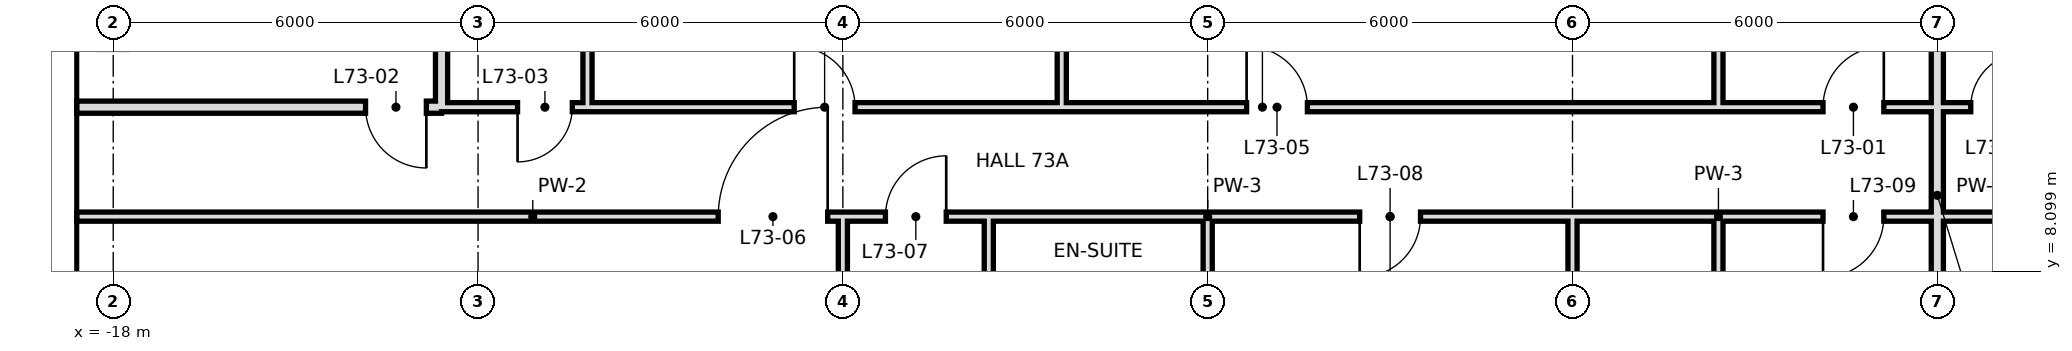
"""IFC4 building model, lengths in metres.
Left out: names, types, materials, properties, quantities, classifications, styles, units other than length and angle.
Written with IfcOpenShell. Run it as: python <this file> out.ifc"""

import sys

from ifc_helpers import new_model, si_unit, direction, frame, frame_2d, origin, place, context, subcontext, project, spatial, rectangle, extrude, element, fill, save


model = new_model("IFC4")
c1 = context("Model", 3, precision=1e-05, world=origin(), true_north=direction((0.0, 1.0)))
c2 = subcontext(c1, "Body", "Model", "MODEL_VIEW")
j1 = project(units=[si_unit("LENGTHUNIT", "METRE"), si_unit("PLANEANGLEUNIT", "RADIAN")], contexts=[c1])
p1 = place(None, origin())
s1 = spatial("IfcSite", under=j1, at=p1, CompositionType="ELEMENT")
p2 = place(p1, origin())
s2 = spatial("IfcBuilding", under=s1, at=p2, CompositionType="ELEMENT")
p3 = place(p2, frame((0.0, 0.0, 308.8)))
s3 = spatial("IfcBuildingStorey", under=s2, at=p3, CompositionType="ELEMENT", Elevation=308.8)
p4 = place(p3, frame((-10.2, 10.8, 0.0), z_axis=(0.0, 0.0, 1.0), x_axis=(0.0, 1.0, 0.0)))
e1 = element("IfcWall", 1, at=p4, inside=s3, PredefinedType="PARTITIONING", context=c2, shape_type="SweptSolid", body=[
    extrude(rectangle(XDim=7.2, YDim=0.15, at=frame_2d((3.6, 0.0))), origin(), (0.0, 0.0, 1.0), 3.42),
])
p5 = place(p3, frame((-12.6, 10.8, 0.0), z_axis=(0.0, 0.0, 1.0), x_axis=(0.0, 1.0, 0.0)))
e2 = element("IfcWall", 2, at=p5, inside=s3, PredefinedType="SOLIDWALL", context=c2, shape_type="SweptSolid", body=[
    extrude(rectangle(XDim=7.2, YDim=0.2, at=frame_2d((3.6, 0.0))), origin(), (0.0, 0.0, 1.0), 2.97),
])
p6 = place(p3, frame((-2.4, 10.8, 0.0), z_axis=(0.0, 0.0, 1.0), x_axis=(0.0, 1.0, 0.0)))
e3 = element("IfcWall", 3, at=p6, inside=s3, PredefinedType="PARTITIONING", context=c2, shape_type="SweptSolid", body=[
    extrude(rectangle(XDim=7.2, YDim=0.15, at=frame_2d((3.6, 0.0))), origin(), (0.0, 0.0, 1.0), 3.42),
])
p7 = place(p3, frame((-3.6, 6.0, 0.0), z_axis=(0.0, 0.0, 1.0), x_axis=(0.0, 1.0, 0.0)))
e4 = element("IfcWall", 4, at=p7, inside=s3, PredefinedType="PARTITIONING", context=c2, shape_type="SweptSolid", body=[
    extrude(rectangle(XDim=3.0, YDim=0.15, at=frame_2d((1.5, 0.0))), origin(), (0.0, 0.0, 1.0), 3.42),
])
p8 = place(p3, frame((-6.0, -0.6, 0.0), z_axis=(0.0, 0.0, 1.0), x_axis=(0.0, 1.0, 0.0)))
e5 = element("IfcWall", 5, at=p8, inside=s3, PredefinedType="PARTITIONING", context=c2, shape_type="SweptSolid", body=[
    extrude(rectangle(XDim=9.6, YDim=0.15, at=frame_2d((4.8, 0.0))), origin(), (0.0, 0.0, 1.0), 3.42),
])
p9 = place(p3, frame((0.0, 6.0, 0.0), z_axis=(0.0, 0.0, 1.0), x_axis=(0.0, 1.0, 0.0)))
e6 = element("IfcWall", 6, at=p9, inside=s3, PredefinedType="PARTITIONING", context=c2, shape_type="SweptSolid", body=[
    extrude(rectangle(XDim=3.0, YDim=0.15, at=frame_2d((1.5, 0.0))), origin(), (0.0, 0.0, 1.0), 2.72),
])
p10 = place(p3, frame((12.0, 0.0, 0.0), z_axis=(0.0, 0.0, 1.0), x_axis=(0.0, 1.0, 0.0)))
e7 = element("IfcWall", 7, at=p10, inside=s3, PredefinedType="SOLIDWALL", context=c2, shape_type="SweptSolid", body=[
    extrude(rectangle(XDim=18.7, YDim=0.2, at=frame_2d((9.35, 0.0))), origin(), (0.0, 0.0, 1.0), 2.72),
])
p11 = place(p3, frame((6.0, 6.0, 0.0), z_axis=(0.0, 0.0, 1.0), x_axis=(0.0, 1.0, 0.0)))
e8 = element("IfcWall", 8, at=p11, inside=s3, PredefinedType="PARTITIONING", context=c2, shape_type="SweptSolid", body=[
    extrude(rectangle(XDim=3.0, YDim=0.15, at=frame_2d((1.5, 0.0))), origin(), (0.0, 0.0, 1.0), 2.72),
])
p12 = place(p3, frame((8.4, 10.8, 0.0), z_axis=(0.0, 0.0, 1.0), x_axis=(0.0, 1.0, 0.0)))
e9 = element("IfcWall", 9, at=p12, inside=s3, PredefinedType="PARTITIONING", context=c2, shape_type="SweptSolid", body=[
    extrude(rectangle(XDim=7.9, YDim=0.15, at=frame_2d((3.95, 0.0))), origin(), (0.0, 0.0, 1.0), 3.42),
])
p13 = place(p3, frame((8.4, 6.0, 0.0), z_axis=(0.0, 0.0, 1.0), x_axis=(0.0, 1.0, 0.0)))
e10 = element("IfcWall", 10, at=p13, inside=s3, PredefinedType="PARTITIONING", context=c2, shape_type="SweptSolid", body=[
    extrude(rectangle(XDim=3.0, YDim=0.15, at=frame_2d((1.5, 0.0))), origin(), (0.0, 0.0, 1.0), 3.42),
])
p14 = place(p3, frame((-18.6, 10.8, 0.0), z_axis=(0.0, 0.0, 1.0), x_axis=(1.0, 0.0, 0.0)))
e11 = element("IfcWall", 11, at=p14, inside=s3, PredefinedType="SOLIDWALL", context=c2, shape_type="SweptSolid", body=[
    extrude(rectangle(XDim=6.0, YDim=0.2, at=frame_2d((3.0, 0.0))), origin(), (0.0, 0.0, 1.0), 2.97),
])
p15 = place(p14, frame((4.75, 0.0, 0.0)))
e12 = element("IfcOpeningElement", 12, at=p15, cuts=e11, PredefinedType="OPENING", context=c2, shape_type="SweptSolid", body=[
    extrude(rectangle(XDim=1.0, YDim=2.4, at=frame_2d((0.5, 1.2))), frame((0.0, 0.11, 0.0), z_axis=(0.0, -1.0, 0.0), x_axis=(1.0, 0.0, 0.0)), (0.0, 0.0, 1.0), 0.22),
])
p16 = place(p3, frame((-10.2, 10.8, 0.0), z_axis=(0.0, 0.0, 1.0), x_axis=(1.0, 0.0, 0.0)))
e13 = element("IfcWall", 13, at=p16, inside=s3, PredefinedType="PARTITIONING", context=c2, shape_type="SweptSolid", body=[
    extrude(rectangle(XDim=22.2, YDim=0.15, at=frame_2d((11.1, 0.0))), origin(), (0.0, 0.0, 1.0), 3.42),
])
p17 = place(p16, frame((20.32, 0.0, 0.0)))
e14 = element("IfcOpeningElement", 14, at=p17, cuts=e13, PredefinedType="OPENING", context=c2, shape_type="SweptSolid", body=[
    extrude(rectangle(XDim=1.0, YDim=2.4, at=frame_2d((0.5, 1.2))), frame((0.0, 0.085, 0.0), z_axis=(0.0, -1.0, 0.0), x_axis=(1.0, 0.0, 0.0)), (0.0, 0.0, 1.0), 0.17),
])
p18 = place(p16, frame((3.4, 0.0, 0.0)))
e15 = element("IfcOpeningElement", 15, at=p18, cuts=e13, PredefinedType="OPENING", context=c2, shape_type="SweptSolid", body=[
    extrude(rectangle(XDim=1.0, YDim=2.4, at=frame_2d((0.5, 1.2))), frame((0.0, 0.085, 0.0), z_axis=(0.0, -1.0, 0.0), x_axis=(1.0, 0.0, 0.0)), (0.0, 0.0, 1.0), 0.17),
])
p19 = place(p16, frame((10.84, 0.0, 0.0)))
e16 = element("IfcOpeningElement", 16, at=p19, cuts=e13, PredefinedType="OPENING", context=c2, shape_type="SweptSolid", body=[
    extrude(rectangle(XDim=1.0, YDim=2.4, at=frame_2d((0.5, 1.2))), frame((0.0, 0.085, 0.0), z_axis=(0.0, -1.0, 0.0), x_axis=(1.0, 0.0, 0.0)), (0.0, 0.0, 1.0), 0.17),
])
p20 = place(p3, frame((-12.6, 10.8, 0.0), z_axis=(0.0, 0.0, 1.0), x_axis=(1.0, 0.0, 0.0)))
e17 = element("IfcWall", 17, at=p20, inside=s3, PredefinedType="PARTITIONING", context=c2, shape_type="SweptSolid", body=[
    extrude(rectangle(XDim=2.4, YDim=0.15, at=frame_2d((1.2, 0.0))), origin(), (0.0, 0.0, 1.0), 3.42),
])
p21 = place(p20, frame((1.25, 0.0, 0.0)))
e18 = element("IfcOpeningElement", 18, at=p21, cuts=e17, PredefinedType="OPENING", context=c2, shape_type="SweptSolid", body=[
    extrude(rectangle(XDim=0.9, YDim=2.4, at=frame_2d((0.45, 1.2))), frame((0.0, 0.085, 0.0), z_axis=(0.0, -1.0, 0.0), x_axis=(1.0, 0.0, 0.0)), (0.0, 0.0, 1.0), 0.17),
])
p22 = place(p3, frame((12.0, 10.8, 0.0), z_axis=(0.0, 0.0, 1.0), x_axis=(1.0, 0.0, 0.0)))
e19 = element("IfcWall", 19, at=p22, inside=s3, PredefinedType="PARTITIONING", context=c2, shape_type="SweptSolid", body=[
    extrude(rectangle(XDim=2.4, YDim=0.15, at=frame_2d((1.2, 0.0))), origin(), (0.0, 0.0, 1.0), 3.42),
])
p23 = place(p22, frame((0.55, 0.0, 0.0)))
e20 = element("IfcOpeningElement", 20, at=p23, cuts=e19, PredefinedType="OPENING", context=c2, shape_type="SweptSolid", body=[
    extrude(rectangle(XDim=0.9, YDim=2.4, at=frame_2d((0.45, 1.2))), frame((0.0, 0.085, 0.0), z_axis=(0.0, -1.0, 0.0), x_axis=(1.0, 0.0, 0.0)), (0.0, 0.0, 1.0), 0.17),
])
p24 = place(p3, frame((-18.6, 9.0, 0.0), z_axis=(0.0, 0.0, 1.0), x_axis=(1.0, 0.0, 0.0)))
e21 = element("IfcWall", 21, at=p24, inside=s3, PredefinedType="PARTITIONING", context=c2, shape_type="SweptSolid", body=[
    extrude(rectangle(XDim=15.0, YDim=0.15, at=frame_2d((7.5, 0.0))), origin(), (0.0, 0.0, 1.0), 3.42),
])
p25 = place(p24, frame((10.55, 0.0, 0.0)))
e22 = element("IfcOpeningElement", 22, at=p25, cuts=e21, PredefinedType="OPENING", context=c2, shape_type="SweptSolid", body=[
    extrude(rectangle(XDim=1.8, YDim=2.4, at=frame_2d((0.9, 1.2))), frame((0.0, 0.085, 0.0), z_axis=(0.0, -1.0, 0.0), x_axis=(1.0, 0.0, 0.0)), (0.0, 0.0, 1.0), 0.17),
])
p26 = place(p24, frame((13.3, 0.0, 0.0)))
e23 = element("IfcOpeningElement", 23, at=p26, cuts=e21, PredefinedType="OPENING", context=c2, shape_type="SweptSolid", body=[
    extrude(rectangle(XDim=1.0, YDim=2.4, at=frame_2d((0.5, 1.2))), frame((0.0, 0.085, 0.0), z_axis=(0.0, -1.0, 0.0), x_axis=(1.0, 0.0, 0.0)), (0.0, 0.0, 1.0), 0.17),
])
p27 = place(p3, frame((0.0, 9.0, 0.0), z_axis=(0.0, 0.0, 1.0), x_axis=(1.0, 0.0, 0.0)))
e24 = element("IfcWall", 24, at=p27, inside=s3, PredefinedType="PARTITIONING", context=c2, shape_type="SweptSolid", body=[
    extrude(rectangle(XDim=6.0, YDim=0.15, at=frame_2d((3.0, 0.0))), origin(), (0.0, 0.0, 1.0), 3.42),
])
p28 = place(p27, frame((2.5, 0.0, 0.0)))
e25 = element("IfcOpeningElement", 25, at=p28, cuts=e24, PredefinedType="OPENING", context=c2, shape_type="SweptSolid", body=[
    extrude(rectangle(XDim=1.0, YDim=2.4, at=frame_2d((0.5, 1.2))), frame((0.0, 0.085, 0.0), z_axis=(0.0, -1.0, 0.0), x_axis=(1.0, 0.0, 0.0)), (0.0, 0.0, 1.0), 0.17),
])
p29 = place(p3, frame((8.4, 9.0, 0.0), z_axis=(0.0, 0.0, 1.0), x_axis=(1.0, 0.0, 0.0)))
e26 = element("IfcWall", 26, at=p29, inside=s3, PredefinedType="PARTITIONING", context=c2, shape_type="SweptSolid", body=[
    extrude(rectangle(XDim=9.6, YDim=0.15, at=frame_2d((4.8, 0.0))), origin(), (0.0, 0.0, 1.0), 3.42),
])
p30 = place(p29, frame((1.72, 0.0, 0.0)))
e27 = element("IfcOpeningElement", 27, at=p30, cuts=e26, PredefinedType="OPENING", context=c2, shape_type="SweptSolid", body=[
    extrude(rectangle(XDim=1.0, YDim=2.4, at=frame_2d((0.5, 1.2))), frame((0.0, 0.085, 0.0), z_axis=(0.0, -1.0, 0.0), x_axis=(1.0, 0.0, 0.0)), (0.0, 0.0, 1.0), 0.17),
])
p31 = place(p29, frame((5.2, 0.0, 0.0)))
e28 = element("IfcOpeningElement", 28, at=p31, cuts=e26, PredefinedType="OPENING", context=c2, shape_type="SweptSolid", body=[
    extrude(rectangle(XDim=1.0, YDim=2.4, at=frame_2d((0.5, 1.2))), frame((0.0, 0.085, 0.0), z_axis=(0.0, -1.0, 0.0), x_axis=(1.0, 0.0, 0.0)), (0.0, 0.0, 1.0), 0.17),
])
p32 = place(p3, frame((-3.6, 9.0, 0.0), z_axis=(0.0, 0.0, 1.0), x_axis=(1.0, 0.0, 0.0)))
e29 = element("IfcWall", 29, at=p32, inside=s3, PredefinedType="PARTITIONING", context=c2, shape_type="SweptSolid", body=[
    extrude(rectangle(XDim=3.6, YDim=0.15, at=frame_2d((1.8, 0.0))), origin(), (0.0, 0.0, 1.0), 3.42),
])
p33 = place(p3, frame((6.0, 9.0, 0.0), z_axis=(0.0, 0.0, 1.0), x_axis=(1.0, 0.0, 0.0)))
e30 = element("IfcWall", 30, at=p33, inside=s3, PredefinedType="PARTITIONING", context=c2, shape_type="SweptSolid", body=[
    extrude(rectangle(XDim=2.4, YDim=0.15, at=frame_2d((1.2, 0.0))), origin(), (0.0, 0.0, 1.0), 3.42),
])
p34 = place(p17, frame((1.0, 0.0, 0.0), z_axis=(0.0, 0.0, 1.0), x_axis=(-1.0, 0.0, 0.0)))
e31 = element("IfcDoor", 31, at=p34, inside=s3, OperationType="SINGLE_SWING_LEFT", PredefinedType="DOOR", context=c2, shape_type="SweptSolid", body=[
    extrude(rectangle(XDim=1.0, YDim=2.4, at=frame_2d((0.5, 1.2))), frame((0.0, 0.025, 0.0), z_axis=(0.0, -1.0, 0.0), x_axis=(1.0, 0.0, 0.0)), (0.0, 0.0, 1.0), 0.05),
])
fill(e14, e31)
p35 = place(p15, origin())
e32 = element("IfcDoor", 32, at=p35, inside=s3, OperationType="SINGLE_SWING_RIGHT", PredefinedType="DOOR", context=c2, shape_type="SweptSolid", body=[
    extrude(rectangle(XDim=1.0, YDim=2.4, at=frame_2d((0.5, 1.2))), frame((0.0, 0.025, 0.0), z_axis=(0.0, -1.0, 0.0), x_axis=(1.0, 0.0, 0.0)), (0.0, 0.0, 1.0), 0.05),
])
fill(e12, e32)
p36 = place(p21, frame((0.9, 0.0, 0.0), z_axis=(0.0, 0.0, 1.0), x_axis=(-1.0, 0.0, 0.0)))
e33 = element("IfcDoor", 33, at=p36, inside=s3, OperationType="SINGLE_SWING_RIGHT", PredefinedType="DOOR", context=c2, shape_type="SweptSolid", body=[
    extrude(rectangle(XDim=0.9, YDim=2.4, at=frame_2d((0.45, 1.2))), frame((0.0, 0.025, 0.0), z_axis=(0.0, -1.0, 0.0), x_axis=(1.0, 0.0, 0.0)), (0.0, 0.0, 1.0), 0.05),
])
fill(e18, e33)
p37 = place(p18, origin())
e34 = element("IfcDoor", 34, at=p37, inside=s3, OperationType="SINGLE_SWING_LEFT", PredefinedType="DOOR", context=c2, shape_type="SweptSolid", body=[
    extrude(rectangle(XDim=1.0, YDim=2.4, at=frame_2d((0.5, 1.2))), frame((0.0, 0.025, 0.0), z_axis=(0.0, -1.0, 0.0), x_axis=(1.0, 0.0, 0.0)), (0.0, 0.0, 1.0), 0.05),
])
fill(e15, e34)
p38 = place(p19, origin())
e35 = element("IfcDoor", 35, at=p38, inside=s3, OperationType="SINGLE_SWING_LEFT", PredefinedType="DOOR", context=c2, shape_type="SweptSolid", body=[
    extrude(rectangle(XDim=1.0, YDim=2.4, at=frame_2d((0.5, 1.2))), frame((0.0, 0.025, 0.0), z_axis=(0.0, -1.0, 0.0), x_axis=(1.0, 0.0, 0.0)), (0.0, 0.0, 1.0), 0.05),
])
fill(e16, e35)
p39 = place(p25, frame((1.8, 0.0, 0.0), z_axis=(0.0, 0.0, 1.0), x_axis=(-1.0, 0.0, 0.0)))
e36 = element("IfcDoor", 36, at=p39, inside=s3, OperationType="SINGLE_SWING_LEFT", PredefinedType="DOOR", context=c2, shape_type="SweptSolid", body=[
    extrude(rectangle(XDim=1.8, YDim=2.4, at=frame_2d((0.9, 1.2))), frame((0.0, 0.025, 0.0), z_axis=(0.0, -1.0, 0.0), x_axis=(1.0, 0.0, 0.0)), (0.0, 0.0, 1.0), 0.05),
])
fill(e22, e36)
p40 = place(p26, frame((1.0, 0.0, 0.0), z_axis=(0.0, 0.0, 1.0), x_axis=(-1.0, 0.0, 0.0)))
e37 = element("IfcDoor", 37, at=p40, inside=s3, OperationType="SINGLE_SWING_LEFT", PredefinedType="DOOR", context=c2, shape_type="SweptSolid", body=[
    extrude(rectangle(XDim=1.0, YDim=2.4, at=frame_2d((0.5, 1.2))), frame((0.0, 0.025, 0.0), z_axis=(0.0, -1.0, 0.0), x_axis=(1.0, 0.0, 0.0)), (0.0, 0.0, 1.0), 0.05),
])
fill(e23, e37)
p41 = place(p28, frame((1.0, 0.0, 0.0), z_axis=(0.0, 0.0, 1.0), x_axis=(-1.0, 0.0, 0.0)))
e38 = element("IfcDoor", 38, at=p41, inside=s3, OperationType="SINGLE_SWING_RIGHT", PredefinedType="DOOR", context=c2, shape_type="SweptSolid", body=[
    extrude(rectangle(XDim=1.0, YDim=2.4, at=frame_2d((0.5, 1.2))), frame((0.0, 0.025, 0.0), z_axis=(0.0, -1.0, 0.0), x_axis=(1.0, 0.0, 0.0)), (0.0, 0.0, 1.0), 0.05),
])
fill(e25, e38)
p42 = place(p30, frame((1.0, 0.0, 0.0), z_axis=(0.0, 0.0, 1.0), x_axis=(-1.0, 0.0, 0.0)))
e39 = element("IfcDoor", 39, at=p42, inside=s3, OperationType="SINGLE_SWING_RIGHT", PredefinedType="DOOR", context=c2, shape_type="SweptSolid", body=[
    extrude(rectangle(XDim=1.0, YDim=2.4, at=frame_2d((0.5, 1.2))), frame((0.0, 0.025, 0.0), z_axis=(0.0, -1.0, 0.0), x_axis=(1.0, 0.0, 0.0)), (0.0, 0.0, 1.0), 0.05),
])
fill(e27, e39)
p43 = place(p23, frame((0.9, 0.0, 0.0), z_axis=(0.0, 0.0, 1.0), x_axis=(-1.0, 0.0, 0.0)))
e40 = element("IfcDoor", 40, at=p43, inside=s3, OperationType="SINGLE_SWING_LEFT", PredefinedType="DOOR", context=c2, shape_type="SweptSolid", body=[
    extrude(rectangle(XDim=0.9, YDim=2.4, at=frame_2d((0.45, 1.2))), frame((0.0, 0.025, 0.0), z_axis=(0.0, -1.0, 0.0), x_axis=(1.0, 0.0, 0.0)), (0.0, 0.0, 1.0), 0.05),
])
fill(e20, e40)
save(model, sys.argv[1])
